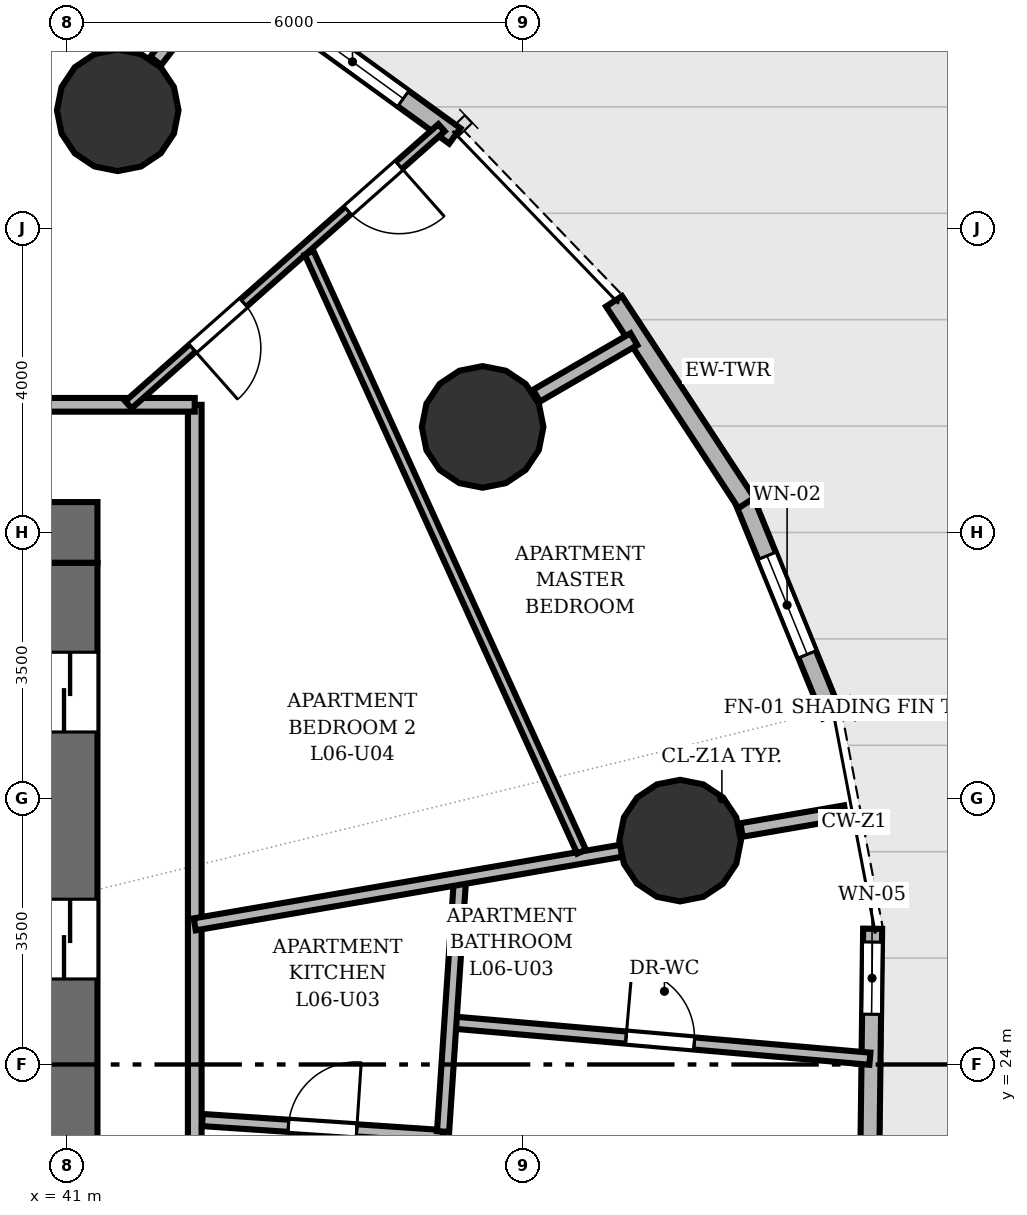
"""IFC4 building model, lengths in metres.
Left out: names, types, materials, properties, quantities, classifications, styles, units other than length and angle.
Written with IfcOpenShell. Run it as: python <this file> out.ifc"""

import sys

from ifc_helpers import new_model, si_unit, direction, frame, frame_2d, origin, origin_2d, place, context, subcontext, project, spatial, rectangle, circle, extrude, element, fill, save


model = new_model("IFC4")
c1 = context("Model", 3, precision=1e-05, world=origin(), true_north=direction((0.0, 1.0)))
c2 = subcontext(c1, "Body", "Model", "MODEL_VIEW")
j1 = project(units=[si_unit("LENGTHUNIT", "METRE"), si_unit("PLANEANGLEUNIT", "RADIAN")], contexts=[c1])
p1 = place(None, origin())
s1 = spatial("IfcSite", under=j1, at=p1, CompositionType="ELEMENT")
p2 = place(p1, origin())
s2 = spatial("IfcBuilding", under=s1, at=p2, CompositionType="ELEMENT")
p3 = place(p2, frame((0.0, 0.0, 24.8)))
s3 = spatial("IfcBuildingStorey", under=s2, at=p3, CompositionType="ELEMENT", Elevation=24.8)
p4 = place(p3, frame((22.6, 31.0, 0.0), z_axis=(0.0, 0.0, 1.0), x_axis=(1.0, 0.0, 0.0)))
e1 = element("IfcWall", 1, at=p4, inside=s3, PredefinedType="SHEAR", context=c2, shape_type="SweptSolid", body=[
    extrude(rectangle(XDim=18.8, YDim=0.8, at=frame_2d((9.4, 0.0))), origin(), (0.0, 0.0, 1.0), 3.2),
])
p5 = place(p4, frame((11.8, 0.0, 0.0)))
e2 = element("IfcOpeningElement", 2, at=p5, cuts=e1, PredefinedType="OPENING", context=c2, shape_type="SweptSolid", body=[
    extrude(rectangle(XDim=1.1, YDim=2.15, at=frame_2d((0.55, 1.075))), frame((0.0, 0.41, 0.0), z_axis=(0.0, -1.0, 0.0), x_axis=(1.0, 0.0, 0.0)), (0.0, 0.0, 1.0), 0.82),
])
p6 = place(p3, frame((41.0, 17.4, 0.0), z_axis=(0.0, 0.0, 1.0), x_axis=(0.0, 1.0, 0.0)))
e3 = element("IfcWall", 3, at=p6, inside=s3, PredefinedType="SHEAR", context=c2, shape_type="SweptSolid", body=[
    extrude(rectangle(XDim=13.2, YDim=0.8, at=frame_2d((6.6, 0.0))), origin(), (0.0, 0.0, 1.0), 3.2),
])
p7 = place(p6, frame((1.175, 0.0, 0.0)))
e4 = element("IfcOpeningElement", 4, at=p7, cuts=e3, PredefinedType="OPENING", context=c2, shape_type="SweptSolid", body=[
    extrude(rectangle(XDim=1.05, YDim=2.15, at=frame_2d((0.525, 1.075))), frame((0.0, 0.41, 0.0), z_axis=(0.0, -1.0, 0.0), x_axis=(1.0, 0.0, 0.0)), (0.0, 0.0, 1.0), 0.82),
])
p8 = place(p6, frame((4.425, 0.0, 0.0)))
e5 = element("IfcOpeningElement", 5, at=p8, cuts=e3, PredefinedType="OPENING", context=c2, shape_type="SweptSolid", body=[
    extrude(rectangle(XDim=1.05, YDim=2.15, at=frame_2d((0.525, 1.075))), frame((0.0, 0.41, 0.0), z_axis=(0.0, -1.0, 0.0), x_axis=(1.0, 0.0, 0.0)), (0.0, 0.0, 1.0), 0.82),
])
p9 = place(p6, frame((7.725, 0.0, 0.0)))
e6 = element("IfcOpeningElement", 6, at=p9, cuts=e3, PredefinedType="OPENING", context=c2, shape_type="SweptSolid", body=[
    extrude(rectangle(XDim=1.05, YDim=2.15, at=frame_2d((0.525, 1.075))), frame((0.0, 0.41, 0.0), z_axis=(0.0, -1.0, 0.0), x_axis=(1.0, 0.0, 0.0)), (0.0, 0.0, 1.0), 0.82),
])
p10 = place(p6, frame((10.975, 0.0, 0.0)))
e7 = element("IfcOpeningElement", 7, at=p10, cuts=e3, PredefinedType="OPENING", context=c2, shape_type="SweptSolid", body=[
    extrude(rectangle(XDim=1.05, YDim=2.15, at=frame_2d((0.525, 1.075))), frame((0.0, 0.41, 0.0), z_axis=(0.0, -1.0, 0.0), x_axis=(1.0, 0.0, 0.0)), (0.0, 0.0, 1.0), 0.82),
])
for number, where, z_axis, x_axis in (
    (8, (49.066, 26.946, 0.0), (0.0, 0.0, 1.0), (1.0, 0.0, 0.0)),
    (9, (46.468, 32.389, 0.0), (0.0, 0.0, 1.0), (1.0, 0.0, 0.0)),
    (10, (41.667, 36.555, 0.0), (0.0, 0.0, 1.0), (1.0, 0.0, 0.0)),
):
    element("IfcColumn", number, at=place(p3, frame(where, z_axis=z_axis, x_axis=x_axis)), inside=s3, PredefinedType="COLUMN", context=c2, shape_type="SweptSolid", body=[
        extrude(circle(Radius=0.8, at=origin_2d()), origin(), (0.0, 0.0, 1.0), 3.2),
    ])
p11 = place(p3, frame((49.885, 31.489, 0.0), z_axis=(0.0, 0.0, 1.0), x_axis=(0.377493207518, -0.926012353199, 0.0)))
e11 = element("IfcWall", 11, at=p11, inside=s3, PredefinedType="SOLIDWALL", context=c2, shape_type="SweptSolid", body=[
    extrude(rectangle(XDim=3.121, YDim=0.25, at=frame_2d((1.56, 0.0))), origin(), (0.0, 0.0, 1.0), 2.96),
])
p12 = place(p11, frame((0.86, 0.0, 0.85)))
e12 = element("IfcOpeningElement", 12, at=p12, cuts=e11, PredefinedType="OPENING", context=c2, shape_type="SweptSolid", body=[
    extrude(rectangle(XDim=1.4, YDim=1.55, at=frame_2d((0.7, 0.775))), frame((0.0, 0.135, 0.0), z_axis=(0.0, -1.0, 0.0), x_axis=(1.0, 0.0, 0.0)), (0.0, 0.0, 1.0), 0.27),
])
p13 = place(p3, frame((48.196, 34.042, 0.0), z_axis=(0.0, 0.0, 1.0), x_axis=(0.548579153619, -0.836098625889, 0.0)))
e13 = element("IfcWall", 13, at=p13, inside=s3, PredefinedType="SOLIDWALL", context=c2, shape_type="SweptSolid", body=[
    extrude(rectangle(XDim=3.174, YDim=0.25, at=frame_2d((1.587, 0.0))), origin(), (0.0, 0.0, 1.0), 2.96),
])
p14 = place(p3, frame((43.411, 38.168, 0.0), z_axis=(0.0, 0.0, 1.0), x_axis=(0.809637503316, -0.58693024562, 0.0)))
e14 = element("IfcWall", 14, at=p14, inside=s3, PredefinedType="SOLIDWALL", context=c2, shape_type="SweptSolid", body=[
    extrude(rectangle(XDim=3.323, YDim=0.25, at=frame_2d((1.661, 0.0))), origin(), (0.0, 0.0, 1.0), 2.96),
])
p15 = place(p14, frame((0.836, 0.0, 0.85)))
e15 = element("IfcOpeningElement", 15, at=p15, cuts=e14, PredefinedType="OPENING", context=c2, shape_type="SweptSolid", body=[
    extrude(rectangle(XDim=1.65, YDim=1.55, at=frame_2d((0.825, 0.775))), frame((0.0, 0.135, 0.0), z_axis=(0.0, -1.0, 0.0), x_axis=(1.0, 0.0, 0.0)), (0.0, 0.0, 1.0), 0.27),
])
p16 = place(p3, frame((51.599, 25.786, 0.0), z_axis=(0.0, 0.0, 1.0), x_axis=(-0.012397373015, -0.999923149618, 0.0)))
e16 = element("IfcWall", 16, at=p16, inside=s3, PredefinedType="SOLIDWALL", context=c2, shape_type="SweptSolid", body=[
    extrude(rectangle(XDim=3.092, YDim=0.25, at=frame_2d((1.546, 0.0))), origin(), (0.0, 0.0, 1.0), 2.96),
])
p17 = place(p16, frame((0.175, 0.0, 0.85)))
e17 = element("IfcOpeningElement", 17, at=p17, cuts=e16, PredefinedType="OPENING", context=c2, shape_type="SweptSolid", body=[
    extrude(rectangle(XDim=0.95, YDim=1.45, at=frame_2d((0.475, 0.725))), frame((0.0, 0.135, 0.0), z_axis=(0.0, -1.0, 0.0), x_axis=(1.0, 0.0, 0.0)), (0.0, 0.0, 1.0), 0.27),
])
p18 = place(p3, frame((49.874, 27.085, 0.0), z_axis=(0.0, 0.0, 1.0), x_axis=(0.985429571056, 0.170083980696, 0.0)))
e18 = element("IfcWall", 18, at=p18, inside=s3, PredefinedType="PARTITIONING", context=c2, shape_type="SweptSolid", body=[
    extrude(rectangle(XDim=1.385, YDim=0.18, at=frame_2d((0.693, 0.0))), origin(), (0.0, 0.0, 1.0), 2.178),
])
p19 = place(p3, frame((47.177, 32.8, 0.0), z_axis=(0.0, 0.0, 1.0), x_axis=(0.865049792178, 0.501686014408, 0.0)))
e19 = element("IfcWall", 19, at=p19, inside=s3, PredefinedType="PARTITIONING", context=c2, shape_type="SweptSolid", body=[
    extrude(rectangle(XDim=1.481, YDim=0.18, at=frame_2d((0.74, 0.0))), origin(), (0.0, 0.0, 1.0), 2.178),
])
p20 = place(p3, frame((42.167, 37.205, 0.0), z_axis=(0.0, 0.0, 1.0), x_axis=(0.609967804345, 0.792426196982, 0.0)))
e20 = element("IfcWall", 20, at=p20, inside=s3, PredefinedType="PARTITIONING", context=c2, shape_type="SweptSolid", body=[
    extrude(rectangle(XDim=1.377, YDim=0.18, at=frame_2d((0.688, 0.0))), origin(), (0.0, 0.0, 1.0), 2.178),
])
p21 = place(p3, frame((42.68, 32.68, 0.0), z_axis=(0.0, 0.0, 1.0), x_axis=(0.0, -1.0, 0.0)))
e21 = element("IfcWall", 21, at=p21, inside=s3, PredefinedType="PARTITIONING", context=c2, shape_type="SweptSolid", body=[
    extrude(rectangle(XDim=17.36, YDim=0.18, at=frame_2d((8.68, 0.0))), origin(), (0.0, 0.0, 1.0), 2.955),
])
p22 = place(p21, frame((10.24, 0.0, 0.0)))
e22 = element("IfcOpeningElement", 22, at=p22, cuts=e21, PredefinedType="OPENING", context=c2, shape_type="SweptSolid", body=[
    extrude(rectangle(XDim=1.05, YDim=2.15, at=frame_2d((0.525, 1.075))), frame((0.0, 0.1, 0.0), z_axis=(0.0, -1.0, 0.0), x_axis=(1.0, 0.0, 0.0)), (0.0, 0.0, 1.0), 0.2),
])
p23 = place(p3, frame((30.102, 32.68, 0.0), z_axis=(0.0, 0.0, 1.0), x_axis=(1.0, 0.0, 0.0)))
e23 = element("IfcWall", 23, at=p23, inside=s3, PredefinedType="PARTITIONING", context=c2, shape_type="SweptSolid", body=[
    extrude(rectangle(XDim=12.578, YDim=0.18, at=frame_2d((6.289, 0.0))), origin(), (0.0, 0.0, 1.0), 2.955),
])
p24 = place(p23, frame((8.233, 0.0, 0.0)))
e24 = element("IfcOpeningElement", 24, at=p24, cuts=e23, PredefinedType="OPENING", context=c2, shape_type="SweptSolid", body=[
    extrude(rectangle(XDim=1.05, YDim=2.15, at=frame_2d((0.525, 1.075))), frame((0.0, 0.1, 0.0), z_axis=(0.0, -1.0, 0.0), x_axis=(1.0, 0.0, 0.0)), (0.0, 0.0, 1.0), 0.2),
])
p25 = place(p3, frame((46.044, 24.555, 0.0), z_axis=(0.0, 0.0, 1.0), x_axis=(0.996262385211, -0.086378584226, 0.0)))
e25 = element("IfcWall", 25, at=p25, inside=s3, PredefinedType="PLUMBINGWALL", context=c2, shape_type="SweptSolid", body=[
    extrude(rectangle(XDim=5.54, YDim=0.16, at=frame_2d((2.77, 0.0))), origin(), (0.0, 0.0, 1.0), 2.641),
])
p26 = place(p25, frame((2.32, 0.0, 0.0)))
e26 = element("IfcOpeningElement", 26, at=p26, cuts=e25, PredefinedType="OPENING", context=c2, shape_type="SweptSolid", body=[
    extrude(rectangle(XDim=0.9, YDim=2.1, at=frame_2d((0.45, 1.05))), frame((0.0, 0.09, 0.0), z_axis=(0.0, -1.0, 0.0), x_axis=(1.0, 0.0, 0.0)), (0.0, 0.0, 1.0), 0.18),
])
p27 = place(p3, frame((42.78, 23.269, 0.0), z_axis=(0.0, 0.0, 1.0), x_axis=(0.99776911562, -0.066759208461, 0.0)))
e27 = element("IfcWall", 27, at=p27, inside=s3, PredefinedType="PLUMBINGWALL", context=c2, shape_type="SweptSolid", body=[
    extrude(rectangle(XDim=3.171, YDim=0.16, at=frame_2d((1.585, 0.0))), origin(), (0.0, 0.0, 1.0), 2.641),
])
p28 = place(p27, frame((1.135, 0.0, 0.0)))
e28 = element("IfcOpeningElement", 28, at=p28, cuts=e27, PredefinedType="OPENING", context=c2, shape_type="SweptSolid", body=[
    extrude(rectangle(XDim=0.9, YDim=2.1, at=frame_2d((0.45, 1.05))), frame((0.0, 0.09, 0.0), z_axis=(0.0, -1.0, 0.0), x_axis=(1.0, 0.0, 0.0)), (0.0, 0.0, 1.0), 0.18),
])
p29 = place(p3, frame((45.947, 23.117, 0.0), z_axis=(0.0, 0.0, 1.0), x_axis=(0.066888153037, 0.997760479766, 0.0)))
e29 = element("IfcWall", 29, at=p29, inside=s3, PredefinedType="PLUMBINGWALL", context=c2, shape_type="SweptSolid", body=[
    extrude(rectangle(XDim=3.336, YDim=0.16, at=frame_2d((1.668, 0.0))), origin(), (0.0, 0.0, 1.0), 2.955),
])
p30 = place(p3, frame((42.68, 25.844, 0.0), z_axis=(0.0, 0.0, 1.0), x_axis=(0.985435597438, 0.170049061456, 0.0)))
e30 = element("IfcWall", 30, at=p30, inside=s3, PredefinedType="PLUMBINGWALL", context=c2, shape_type="SweptSolid", body=[
    extrude(rectangle(XDim=5.694, YDim=0.16, at=frame_2d((2.847, 0.0))), origin(), (0.0, 0.0, 1.0), 2.178),
])
p31 = place(p3, frame((45.927, 36.326, 0.0), z_axis=(0.0, 0.0, 1.0), x_axis=(-0.748844909992, -0.662745275939, 0.0)))
e31 = element("IfcWall", 31, at=p31, inside=s3, PredefinedType="PARTITIONING", context=c2, shape_type="SweptSolid", body=[
    extrude(rectangle(XDim=5.501, YDim=0.125, at=frame_2d((2.75, 0.0))), origin(), (0.0, 0.0, 1.0), 2.955),
])
p32 = place(p31, frame((0.746, 0.0, 0.0)))
e32 = element("IfcOpeningElement", 32, at=p32, cuts=e31, PredefinedType="OPENING", context=c2, shape_type="SweptSolid", body=[
    extrude(rectangle(XDim=0.9, YDim=2.1, at=frame_2d((0.45, 1.05))), frame((0.0, 0.073, 0.0), z_axis=(0.0, -1.0, 0.0), x_axis=(1.0, 0.0, 0.0)), (0.0, 0.0, 1.0), 0.145),
])
p33 = place(p31, frame((3.476, 0.0, 0.0)))
e33 = element("IfcOpeningElement", 33, at=p33, cuts=e31, PredefinedType="OPENING", context=c2, shape_type="SweptSolid", body=[
    extrude(rectangle(XDim=0.9, YDim=2.1, at=frame_2d((0.45, 1.05))), frame((0.0, 0.073, 0.0), z_axis=(0.0, -1.0, 0.0), x_axis=(1.0, 0.0, 0.0)), (0.0, 0.0, 1.0), 0.145),
])
p34 = place(p3, frame((47.769, 26.801, 0.0), z_axis=(0.0, 0.0, 1.0), x_axis=(-0.414076998559, 0.910241857565, 0.0)))
e34 = element("IfcWall", 34, at=p34, inside=s3, PredefinedType="PARTITIONING", context=c2, shape_type="SweptSolid", body=[
    extrude(rectangle(XDim=8.658, YDim=0.125, at=frame_2d((4.329, 0.0))), origin(), (0.0, 0.0, 1.0), 2.328),
])
p35 = place(p12, origin())
e35 = element("IfcWindow", 35, at=p35, inside=s3, PartitioningType="SINGLE_PANEL", PredefinedType="WINDOW", context=c2, shape_type="SweptSolid", body=[
    extrude(rectangle(XDim=1.4, YDim=1.55, at=frame_2d((0.7, 0.775))), frame((0.0, 0.03, 0.0), z_axis=(0.0, -1.0, 0.0), x_axis=(1.0, 0.0, 0.0)), (0.0, 0.0, 1.0), 0.06),
])
fill(e12, e35)
p36 = place(p15, origin())
e36 = element("IfcWindow", 36, at=p36, inside=s3, PartitioningType="SINGLE_PANEL", PredefinedType="WINDOW", context=c2, shape_type="SweptSolid", body=[
    extrude(rectangle(XDim=1.65, YDim=1.55, at=frame_2d((0.825, 0.775))), frame((0.0, 0.03, 0.0), z_axis=(0.0, -1.0, 0.0), x_axis=(1.0, 0.0, 0.0)), (0.0, 0.0, 1.0), 0.06),
])
fill(e15, e36)
p37 = place(p17, origin())
e37 = element("IfcWindow", 37, at=p37, inside=s3, PartitioningType="SINGLE_PANEL", PredefinedType="WINDOW", context=c2, shape_type="SweptSolid", body=[
    extrude(rectangle(XDim=0.95, YDim=1.45, at=frame_2d((0.475, 0.725))), frame((0.0, 0.03, 0.0), z_axis=(0.0, -1.0, 0.0), x_axis=(1.0, 0.0, 0.0)), (0.0, 0.0, 1.0), 0.06),
])
fill(e17, e37)
p38 = place(p9, origin())
e38 = element("IfcDoor", 38, at=p38, inside=s3, OperationType="DOUBLE_DOOR_SLIDING", PredefinedType="DOOR", context=c2, shape_type="SweptSolid", body=[
    extrude(rectangle(XDim=1.05, YDim=2.15, at=frame_2d((0.525, 1.075))), frame((0.0, 0.025, 0.0), z_axis=(0.0, -1.0, 0.0), x_axis=(1.0, 0.0, 0.0)), (0.0, 0.0, 1.0), 0.05),
])
fill(e6, e38)
p39 = place(p10, origin())
e39 = element("IfcDoor", 39, at=p39, inside=s3, OperationType="DOUBLE_DOOR_SLIDING", PredefinedType="DOOR", context=c2, shape_type="SweptSolid", body=[
    extrude(rectangle(XDim=1.05, YDim=2.15, at=frame_2d((0.525, 1.075))), frame((0.0, 0.025, 0.0), z_axis=(0.0, -1.0, 0.0), x_axis=(1.0, 0.0, 0.0)), (0.0, 0.0, 1.0), 0.05),
])
fill(e7, e39)
p40 = place(p26, origin())
e40 = element("IfcDoor", 40, at=p40, inside=s3, OperationType="SINGLE_SWING_LEFT", PredefinedType="DOOR", context=c2, shape_type="SweptSolid", body=[
    extrude(rectangle(XDim=0.9, YDim=2.1, at=frame_2d((0.45, 1.05))), frame((0.0, 0.025, 0.0), z_axis=(0.0, -1.0, 0.0), x_axis=(1.0, 0.0, 0.0)), (0.0, 0.0, 1.0), 0.05),
])
fill(e26, e40)
p41 = place(p28, origin())
e41 = element("IfcDoor", 41, at=p41, inside=s3, OperationType="SINGLE_SWING_RIGHT", PredefinedType="DOOR", context=c2, shape_type="SweptSolid", body=[
    extrude(rectangle(XDim=0.9, YDim=2.1, at=frame_2d((0.45, 1.05))), frame((0.0, 0.025, 0.0), z_axis=(0.0, -1.0, 0.0), x_axis=(1.0, 0.0, 0.0)), (0.0, 0.0, 1.0), 0.05),
])
fill(e28, e41)
p42 = place(p32, origin())
e42 = element("IfcDoor", 42, at=p42, inside=s3, OperationType="SINGLE_SWING_LEFT", PredefinedType="DOOR", context=c2, shape_type="SweptSolid", body=[
    extrude(rectangle(XDim=0.9, YDim=2.1, at=frame_2d((0.45, 1.05))), frame((0.0, 0.025, 0.0), z_axis=(0.0, -1.0, 0.0), x_axis=(1.0, 0.0, 0.0)), (0.0, 0.0, 1.0), 0.05),
])
fill(e32, e42)
p43 = place(p33, origin())
e43 = element("IfcDoor", 43, at=p43, inside=s3, OperationType="SINGLE_SWING_RIGHT", PredefinedType="DOOR", context=c2, shape_type="SweptSolid", body=[
    extrude(rectangle(XDim=0.9, YDim=2.1, at=frame_2d((0.45, 1.05))), frame((0.0, 0.025, 0.0), z_axis=(0.0, -1.0, 0.0), x_axis=(1.0, 0.0, 0.0)), (0.0, 0.0, 1.0), 0.05),
])
fill(e33, e43)
save(model, sys.argv[1])
